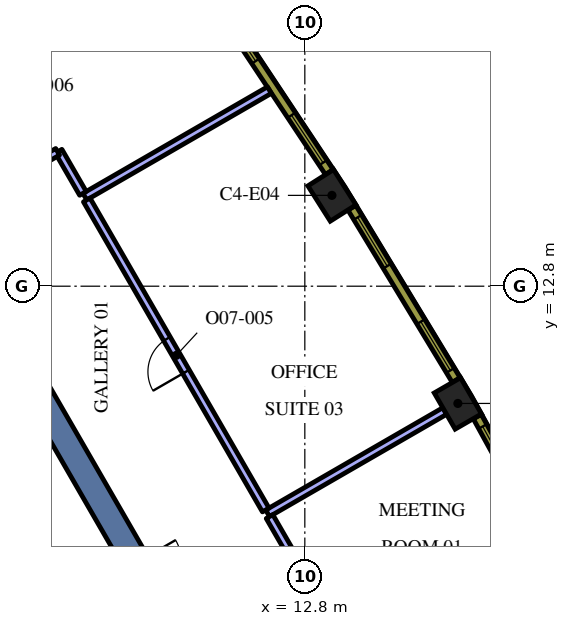
"""IFC4 building model, lengths in metres.
Left out: names, types, materials, properties, quantities, classifications, styles, units other than length and angle.
Written with IfcOpenShell. Run it as: python <this file> out.ifc"""

import sys

from ifc_helpers import new_model, si_unit, direction, frame, frame_2d, origin, origin_2d, place, context, subcontext, project, spatial, polyline, rectangle, outline, extrude, element, fill, save


model = new_model("IFC4")
c1 = context("Model", 3, precision=1e-05, world=origin(), true_north=direction((0.0, 1.0)))
c2 = subcontext(c1, "Body", "Model", "MODEL_VIEW")
j1 = project(units=[si_unit("LENGTHUNIT", "METRE"), si_unit("PLANEANGLEUNIT", "RADIAN")], contexts=[c1])
p1 = place(None, origin())
s1 = spatial("IfcSite", under=j1, at=p1, CompositionType="ELEMENT")
p2 = place(p1, origin())
s2 = spatial("IfcBuilding", under=s1, at=p2, CompositionType="ELEMENT")
p3 = place(p2, frame((0.0, 0.0, 214.2)))
s3 = spatial("IfcBuildingStorey", under=s2, at=p3, CompositionType="ELEMENT", Elevation=214.2)
for number, where, z_axis, x_axis in (
    (1, (16.827, 9.715, 0.0), (0.0, 0.0, 1.0), (-0.5, 0.866, 0.0)),
    (2, (13.513, 15.19, 0.0), (0.0, 0.0, 1.0), (-0.536, 0.845, 0.0)),
):
    element("IfcColumn", number, at=place(p3, frame(where, z_axis=z_axis, x_axis=x_axis)), inside=s3, PredefinedType="COLUMN", context=c2, shape_type="SweptSolid", body=[
        extrude(rectangle(XDim=1.1, YDim=0.8, at=origin_2d()), origin(), (0.0, 0.0, 1.0), 4.2),
    ])
p4 = place(p3, frame((8.235, 5.736, 0.0), z_axis=(0.0, 0.0, 1.0), x_axis=(-0.499983401189, 0.8660349869, 0.0)))
e3 = element("IfcWall", 3, at=p4, inside=s3, PredefinedType="SOLIDWALL", context=c2, shape_type="SweptSolid", body=[
    extrude(rectangle(XDim=12.472, YDim=0.7, at=frame_2d((6.236, 0.0))), origin(), (0.0, 0.0, 1.0), 4.2),
])
p5 = place(p3, origin())
e4 = element("IfcWall", 4, at=p5, inside=s3, PredefinedType="SOLIDWALL", context=c2, shape_type="SweptSolid", body=[
    extrude(outline(polyline([(0.332, 6.925), (0.335, 6.925), (0.335, 6.925), (0.335, 6.925), (0.335, 7.075), (0.335, 7.075), (0.335, 7.075), (0.245, 7.075), (0.035, 7.439), (0.252, 7.564), (0.377, 7.348), (1.512, 5.382), (1.637, 5.165), (2.221, 4.153), (2.771, 3.199), (2.896, 2.983), (3.138, 2.564), (4.031, 1.017), (4.156, 0.801), (5.292, -1.165), (5.417, -1.382), (6.073, -2.519), (6.552, -3.348), (6.677, -3.564), (6.46, -3.689), (0.332, 6.925)])), origin(), (0.0, 0.0, 1.0), 4.2),
])
p6 = place(p3, frame((8.565, -2.185, 0.0), z_axis=(0.0, 0.0, 1.0), x_axis=(-0.499997954832, 0.866026584559, 0.0)))
e5 = element("IfcWall", 5, at=p6, inside=s3, PredefinedType="SOLIDWALL", context=c2, shape_type="SweptSolid", body=[
    extrude(rectangle(XDim=12.35, YDim=0.25, at=frame_2d((6.175, 0.0))), origin(), (0.0, 0.0, 1.0), 4.2),
])
p7 = place(p6, frame((0.585, 0.0, 0.0)))
e6 = element("IfcOpeningElement", 6, at=p7, cuts=e5, PredefinedType="OPENING", context=c2, shape_type="SweptSolid", body=[
    extrude(rectangle(XDim=1.1, YDim=2.1, at=frame_2d((0.55, 1.05))), frame((0.0, 0.135, 0.0), z_axis=(0.0, -1.0, 0.0), x_axis=(1.0, 0.0, 0.0)), (0.0, 0.0, 1.0), 0.27),
])
p8 = place(p3, frame((11.821, 6.825, 0.0), z_axis=(0.0, 0.0, 1.0), x_axis=(0.866011792348, 0.500023574959, 0.0)))
e7 = element("IfcWall", 7, at=p8, inside=s3, PredefinedType="PARTITIONING", context=c2, shape_type="SweptSolid", body=[
    extrude(rectangle(XDim=5.381, YDim=0.2, at=frame_2d((2.69, 0.0))), origin(), (0.0, 0.0, 1.0), 3.45),
])
p9 = place(p3, frame((16.581, -1.419, 0.0), z_axis=(0.0, 0.0, 1.0), x_axis=(-0.500019350398, 0.866014231539, 0.0)))
e8 = element("IfcWall", 8, at=p9, inside=s3, PredefinedType="PARTITIONING", context=c2, shape_type="SweptSolid", body=[
    extrude(rectangle(XDim=9.42, YDim=0.2, at=frame_2d((4.71, 0.0))), origin(), (0.0, 0.0, 1.0), 3.45),
])
p10 = place(p9, frame((4.2, 0.0, 0.0)))
e9 = element("IfcOpeningElement", 9, at=p10, cuts=e8, PredefinedType="OPENING", context=c2, shape_type="SweptSolid", body=[
    extrude(rectangle(XDim=1.0, YDim=2.1, at=frame_2d((0.5, 1.05))), frame((0.0, 0.11, 0.0), z_axis=(0.0, -1.0, 0.0), x_axis=(1.0, 0.0, 0.0)), (0.0, 0.0, 1.0), 0.22),
])
p11 = place(p3, frame((7.011, 15.156, 0.0), z_axis=(0.0, 0.0, 1.0), x_axis=(0.866015917575, 0.500016430238, 0.0)))
e10 = element("IfcWall", 10, at=p11, inside=s3, PredefinedType="PARTITIONING", context=c2, shape_type="SweptSolid", body=[
    extrude(rectangle(XDim=5.607, YDim=0.2, at=frame_2d((2.804, 0.0))), origin(), (0.0, 0.0, 1.0), 3.45),
])
p12 = place(p3, frame((11.771, 6.912, 0.0), z_axis=(0.0, 0.0, 1.0), x_axis=(-0.500008127286, 0.866020711443, 0.0)))
e11 = element("IfcWall", 11, at=p12, inside=s3, PredefinedType="PARTITIONING", context=c2, shape_type="SweptSolid", body=[
    extrude(rectangle(XDim=9.42, YDim=0.2, at=frame_2d((4.71, 0.0))), origin(), (0.0, 0.0, 1.0), 3.45),
])
p13 = place(p12, frame((4.2, 0.0, 0.0)))
e12 = element("IfcOpeningElement", 12, at=p13, cuts=e11, PredefinedType="OPENING", context=c2, shape_type="SweptSolid", body=[
    extrude(rectangle(XDim=1.0, YDim=2.1, at=frame_2d((0.5, 1.05))), frame((0.0, 0.11, 0.0), z_axis=(0.0, -1.0, 0.0), x_axis=(1.0, 0.0, 0.0)), (0.0, 0.0, 1.0), 0.22),
])
p14 = place(p3, frame((6.961, 15.243, 0.0), z_axis=(0.0, 0.0, 1.0), x_axis=(-0.500036104519, 0.866004557827, 0.0)))
e13 = element("IfcWall", 13, at=p14, inside=s3, PredefinedType="PARTITIONING", context=c2, shape_type="SweptSolid", body=[
    extrude(rectangle(XDim=1.28, YDim=0.2, at=frame_2d((0.64, 0.0))), origin(), (0.0, 0.0, 1.0), 3.45),
])
p15 = place(p3, frame((6.295, 16.336, 0.0), z_axis=(0.0, 0.0, 1.0), x_axis=(-0.866088799389, -0.499890179513, 0.0)))
e14 = element("IfcWall", 14, at=p15, inside=s3, PredefinedType="PARTITIONING", context=c2, shape_type="SweptSolid", body=[
    extrude(rectangle(XDim=1.47, YDim=0.2, at=frame_2d((0.735, 0.0))), origin(), (0.0, 0.0, 1.0), 3.45),
])
p16 = place(p3, frame((19.892, 4.725, 0.0), z_axis=(0.0, 0.0, 1.0), x_axis=(-0.481925825015, 0.876212017256, 0.0)))
e15 = element("IfcWall", 15, at=p16, inside=s3, PredefinedType="SOLIDWALL", context=c2, shape_type="SweptSolid", body=[
    extrude(rectangle(XDim=5.299, YDim=0.24, at=frame_2d((2.649, 0.0))), origin(), (0.0, 0.0, 1.0), 3.95),
])
p17 = place(p16, frame((0.295, 0.0, 0.9)))
e16 = element("IfcOpeningElement", 16, at=p17, cuts=e15, PredefinedType="OPENING", context=c2, shape_type="SweptSolid", body=[
    extrude(rectangle(XDim=1.5, YDim=2.55, at=frame_2d((0.75, 1.275))), frame((0.0, 0.13, 0.0), z_axis=(0.0, -1.0, 0.0), x_axis=(1.0, 0.0, 0.0)), (0.0, 0.0, 1.0), 0.26),
])
p18 = place(p16, frame((3.504, 0.0, 0.9)))
e17 = element("IfcOpeningElement", 17, at=p18, cuts=e15, PredefinedType="OPENING", context=c2, shape_type="SweptSolid", body=[
    extrude(rectangle(XDim=1.5, YDim=2.55, at=frame_2d((0.75, 1.275))), frame((0.0, 0.13, 0.0), z_axis=(0.0, -1.0, 0.0), x_axis=(1.0, 0.0, 0.0)), (0.0, 0.0, 1.0), 0.26),
])
p19 = place(p3, frame((16.782, 10.331, 0.0), z_axis=(0.0, 0.0, 1.0), x_axis=(-0.517846166225, 0.855473756538, 0.0)))
e18 = element("IfcWall", 18, at=p19, inside=s3, PredefinedType="SOLIDWALL", context=c2, shape_type="SweptSolid", body=[
    extrude(rectangle(XDim=5.298, YDim=0.24, at=frame_2d((2.649, 0.0))), origin(), (0.0, 0.0, 1.0), 3.95),
])
p20 = place(p19, frame((0.294, 0.0, 0.9)))
e19 = element("IfcOpeningElement", 19, at=p20, cuts=e18, PredefinedType="OPENING", context=c2, shape_type="SweptSolid", body=[
    extrude(rectangle(XDim=1.5, YDim=2.55, at=frame_2d((0.75, 1.275))), frame((0.0, 0.13, 0.0), z_axis=(0.0, -1.0, 0.0), x_axis=(1.0, 0.0, 0.0)), (0.0, 0.0, 1.0), 0.26),
])
p21 = place(p19, frame((3.504, 0.0, 0.9)))
e20 = element("IfcOpeningElement", 20, at=p21, cuts=e18, PredefinedType="OPENING", context=c2, shape_type="SweptSolid", body=[
    extrude(rectangle(XDim=1.5, YDim=2.55, at=frame_2d((0.75, 1.275))), frame((0.0, 0.13, 0.0), z_axis=(0.0, -1.0, 0.0), x_axis=(1.0, 0.0, 0.0)), (0.0, 0.0, 1.0), 0.26),
])
p22 = place(p3, frame((13.442, 15.803, 0.0), z_axis=(0.0, 0.0, 1.0), x_axis=(-0.552901821755, 0.833246407433, 0.0)))
e21 = element("IfcWall", 21, at=p22, inside=s3, PredefinedType="SOLIDWALL", context=c2, shape_type="SweptSolid", body=[
    extrude(rectangle(XDim=5.298, YDim=0.24, at=frame_2d((2.649, 0.0))), origin(), (0.0, 0.0, 1.0), 3.95),
])
p23 = place(p22, frame((0.295, 0.0, 0.9)))
e22 = element("IfcOpeningElement", 22, at=p23, cuts=e21, PredefinedType="OPENING", context=c2, shape_type="SweptSolid", body=[
    extrude(rectangle(XDim=1.5, YDim=2.55, at=frame_2d((0.75, 1.275))), frame((0.0, 0.13, 0.0), z_axis=(0.0, -1.0, 0.0), x_axis=(1.0, 0.0, 0.0)), (0.0, 0.0, 1.0), 0.26),
])
p24 = place(p22, frame((3.504, 0.0, 0.9)))
e23 = element("IfcOpeningElement", 23, at=p24, cuts=e21, PredefinedType="OPENING", context=c2, shape_type="SweptSolid", body=[
    extrude(rectangle(XDim=1.5, YDim=2.55, at=frame_2d((0.75, 1.275))), frame((0.0, 0.13, 0.0), z_axis=(0.0, -1.0, 0.0), x_axis=(1.0, 0.0, 0.0)), (0.0, 0.0, 1.0), 0.26),
])
p25 = place(p13, origin())
e24 = element("IfcDoor", 24, at=p25, inside=s3, OperationType="SINGLE_SWING_LEFT", PredefinedType="DOOR", context=c2, shape_type="SweptSolid", body=[
    extrude(rectangle(XDim=1.0, YDim=2.1, at=frame_2d((0.5, 1.05))), frame((0.0, 0.025, 0.0), z_axis=(0.0, -1.0, 0.0), x_axis=(1.0, 0.0, 0.0)), (0.0, 0.0, 1.0), 0.05),
])
fill(e12, e24)
p26 = place(p18, origin())
e25 = element("IfcWindow", 25, at=p26, inside=s3, PartitioningType="SINGLE_PANEL", PredefinedType="WINDOW", context=c2, shape_type="SweptSolid", body=[
    extrude(rectangle(XDim=1.5, YDim=2.55, at=frame_2d((0.75, 1.275))), frame((0.0, 0.04, 0.0), z_axis=(0.0, -1.0, 0.0), x_axis=(1.0, 0.0, 0.0)), (0.0, 0.0, 1.0), 0.06),
])
fill(e17, e25)
p27 = place(p20, origin())
e26 = element("IfcWindow", 26, at=p27, inside=s3, PartitioningType="SINGLE_PANEL", PredefinedType="WINDOW", context=c2, shape_type="SweptSolid", body=[
    extrude(rectangle(XDim=1.5, YDim=2.55, at=frame_2d((0.75, 1.275))), frame((0.0, 0.04, 0.0), z_axis=(0.0, -1.0, 0.0), x_axis=(1.0, 0.0, 0.0)), (0.0, 0.0, 1.0), 0.06),
])
fill(e19, e26)
p28 = place(p21, origin())
e27 = element("IfcWindow", 27, at=p28, inside=s3, PartitioningType="SINGLE_PANEL", PredefinedType="WINDOW", context=c2, shape_type="SweptSolid", body=[
    extrude(rectangle(XDim=1.5, YDim=2.55, at=frame_2d((0.75, 1.275))), frame((0.0, 0.04, 0.0), z_axis=(0.0, -1.0, 0.0), x_axis=(1.0, 0.0, 0.0)), (0.0, 0.0, 1.0), 0.06),
])
fill(e20, e27)
p29 = place(p23, origin())
e28 = element("IfcWindow", 28, at=p29, inside=s3, PartitioningType="SINGLE_PANEL", PredefinedType="WINDOW", context=c2, shape_type="SweptSolid", body=[
    extrude(rectangle(XDim=1.5, YDim=2.55, at=frame_2d((0.75, 1.275))), frame((0.0, 0.04, 0.0), z_axis=(0.0, -1.0, 0.0), x_axis=(1.0, 0.0, 0.0)), (0.0, 0.0, 1.0), 0.06),
])
fill(e22, e28)
p30 = place(p24, origin())
e29 = element("IfcWindow", 29, at=p30, inside=s3, PartitioningType="SINGLE_PANEL", PredefinedType="WINDOW", context=c2, shape_type="SweptSolid", body=[
    extrude(rectangle(XDim=1.5, YDim=2.55, at=frame_2d((0.75, 1.275))), frame((0.0, 0.04, 0.0), z_axis=(0.0, -1.0, 0.0), x_axis=(1.0, 0.0, 0.0)), (0.0, 0.0, 1.0), 0.06),
])
fill(e23, e29)
save(model, sys.argv[1])
